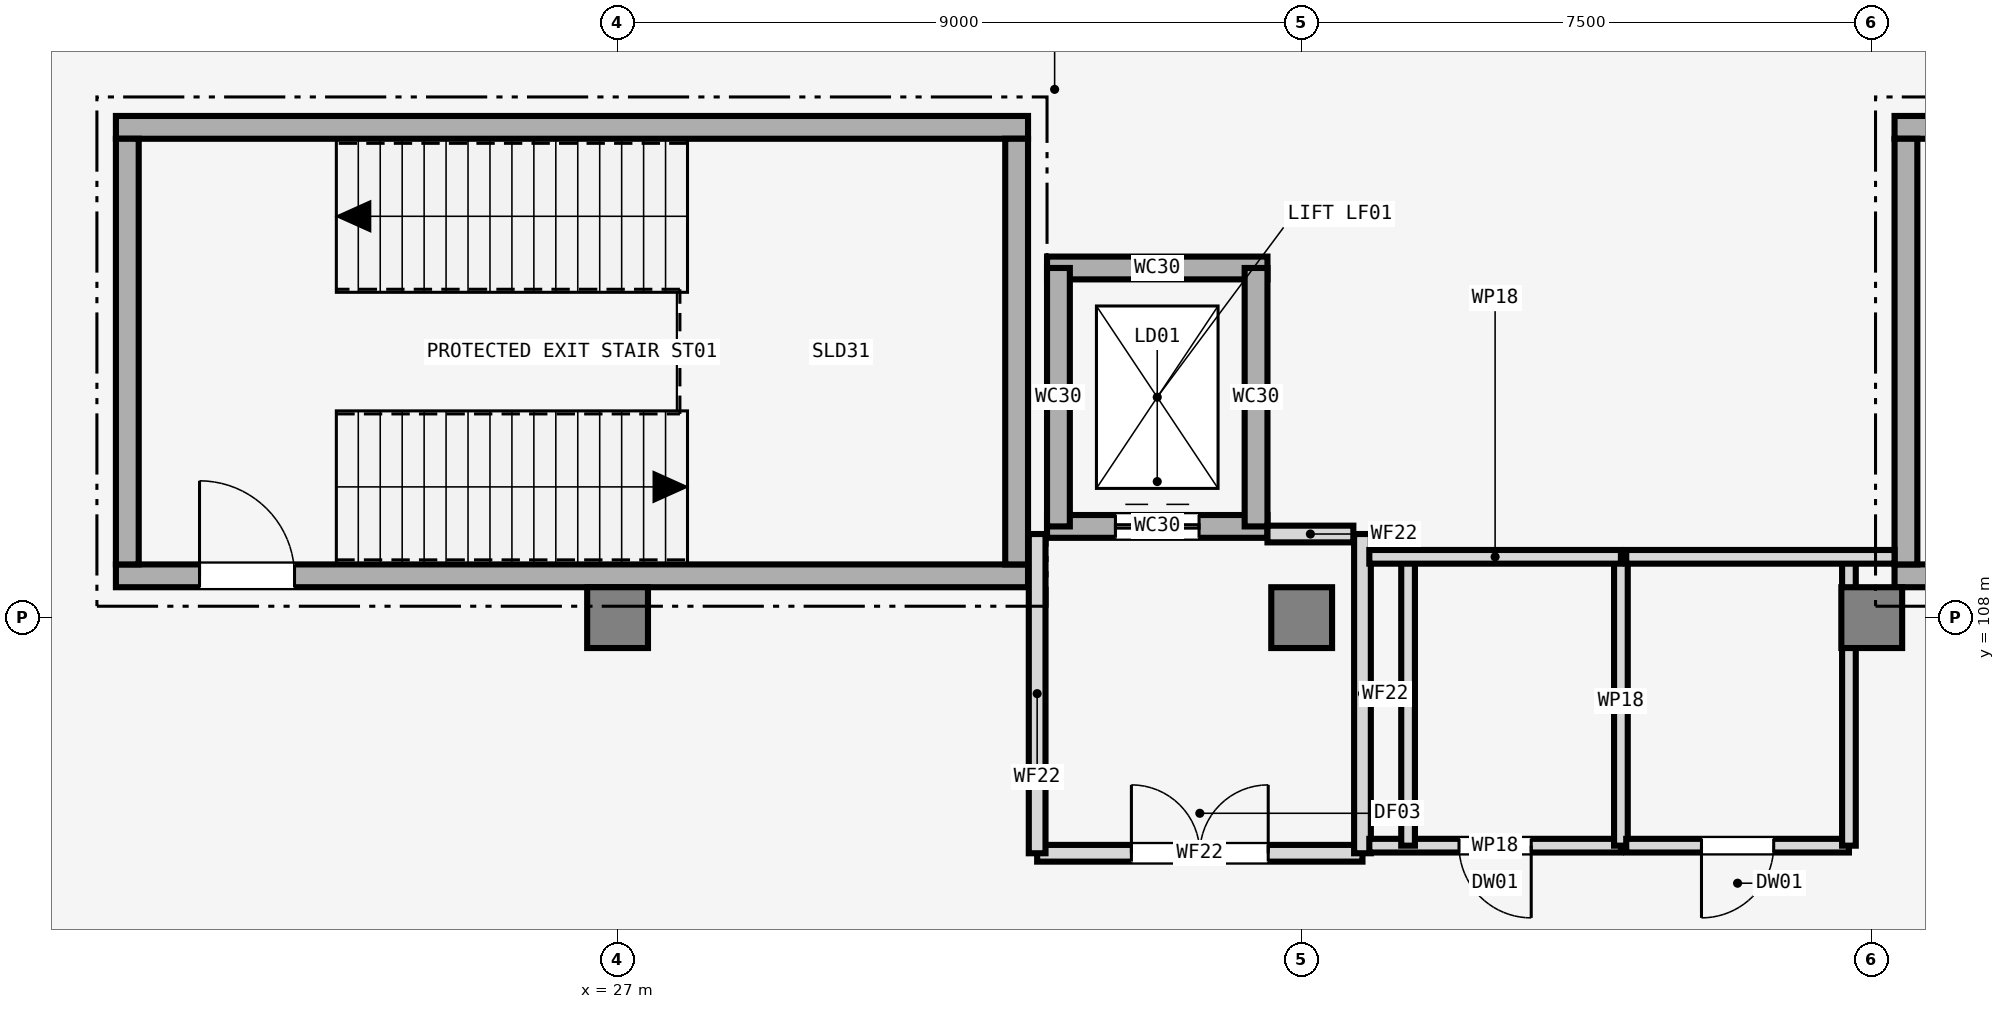
"""IFC4 building model, lengths in metres.
Left out: names, types, materials, properties, quantities, classifications, styles, units other than length and angle.
Written with IfcOpenShell. Run it as: python <this file> out.ifc"""

import sys

from ifc_helpers import new_model, si_unit, direction, frame, frame_2d, origin, origin_2d, place, context, subcontext, project, spatial, rectangle, extrude, element, fill, save


model = new_model("IFC4")
c1 = context("Model", 3, precision=1e-05, world=origin(), true_north=direction((0.0, 1.0)))
c2 = subcontext(c1, "Body", "Model", "MODEL_VIEW")
j1 = project(units=[si_unit("LENGTHUNIT", "METRE"), si_unit("PLANEANGLEUNIT", "RADIAN")], contexts=[c1])
p1 = place(None, origin())
s1 = spatial("IfcSite", under=j1, at=p1, CompositionType="ELEMENT")
p2 = place(p1, origin())
s2 = spatial("IfcBuilding", under=s1, at=p2, CompositionType="ELEMENT")
p3 = place(p2, frame((0.0, 0.0, -5.4)))
s3 = spatial("IfcBuildingStorey", under=s2, at=p3, CompositionType="ELEMENT", Elevation=-5.4)
for number, where, z_axis, x_axis in (
    (1, (27.0, 108.0, 0.0), (0.0, 0.0, 1.0), (1.0, 0.0, 0.0)),
    (2, (36.0, 108.0, 0.0), (0.0, 0.0, 1.0), (1.0, 0.0, 0.0)),
    (3, (43.5, 108.0, 0.0), (0.0, 0.0, 1.0), (1.0, 0.0, 0.0)),
):
    element("IfcColumn", number, at=place(p3, frame(where, z_axis=z_axis, x_axis=x_axis)), inside=s3, PredefinedType="COLUMN", context=c2, shape_type="SweptSolid", body=[
        extrude(rectangle(XDim=0.8, YDim=0.8, at=origin_2d()), origin(), (0.0, 0.0, 1.0), 5.4),
    ])
p4 = place(p3, frame((20.4, 108.55, 0.0), z_axis=(0.0, 0.0, 1.0), x_axis=(1.0, 0.0, 0.0)))
e4 = element("IfcWall", 4, at=p4, inside=s3, PredefinedType="SHEAR", context=c2, shape_type="SweptSolid", body=[
    extrude(rectangle(XDim=12.0, YDim=0.3, at=frame_2d((6.0, 0.0))), origin(), (0.0, 0.0, 1.0), 5.4),
])
p5 = place(p4, frame((1.1, 0.0, 0.0)))
e5 = element("IfcOpeningElement", 5, at=p5, cuts=e4, PredefinedType="OPENING", context=c2, shape_type="SweptSolid", body=[
    extrude(rectangle(XDim=1.25, YDim=2.15, at=frame_2d((0.625, 1.075))), frame((0.0, 0.16, 0.0), z_axis=(0.0, -1.0, 0.0), x_axis=(1.0, 0.0, 0.0)), (0.0, 0.0, 1.0), 0.32),
])
p6 = place(p3, frame((32.4, 114.45, 0.0), z_axis=(0.0, 0.0, 1.0), x_axis=(-1.0, 0.0, 0.0)))
e6 = element("IfcWall", 6, at=p6, inside=s3, PredefinedType="SHEAR", context=c2, shape_type="SweptSolid", body=[
    extrude(rectangle(XDim=12.0, YDim=0.3, at=frame_2d((6.0, 0.0))), origin(), (0.0, 0.0, 1.0), 5.4),
])
for number, where, z_axis, x_axis in (
    (7, (20.55, 114.3, 0.0), (0.0, 0.0, 1.0), (0.0, -1.0, 0.0)),
    (8, (32.25, 108.7, 0.0), (0.0, 0.0, 1.0), (0.0, 1.0, 0.0)),
):
    element("IfcWall", number, at=place(p3, frame(where, z_axis=z_axis, x_axis=x_axis)), inside=s3, PredefinedType="SHEAR", context=c2, shape_type="SweptSolid", body=[
        extrude(rectangle(XDim=5.6, YDim=0.3, at=frame_2d((2.8, 0.0))), origin(), (0.0, 0.0, 1.0), 5.4),
    ])
p7 = place(p3, frame((43.8, 108.55, 0.0), z_axis=(0.0, 0.0, 1.0), x_axis=(1.0, 0.0, 0.0)))
e9 = element("IfcWall", 9, at=p7, inside=s3, PredefinedType="SHEAR", context=c2, shape_type="SweptSolid", body=[
    extrude(rectangle(XDim=12.0, YDim=0.3, at=frame_2d((6.0, 0.0))), origin(), (0.0, 0.0, 1.0), 5.4),
])
p8 = place(p7, frame((1.1, 0.0, 0.0)))
e10 = element("IfcOpeningElement", 10, at=p8, cuts=e9, PredefinedType="OPENING", context=c2, shape_type="SweptSolid", body=[
    extrude(rectangle(XDim=1.25, YDim=2.15, at=frame_2d((0.625, 1.075))), frame((0.0, 0.16, 0.0), z_axis=(0.0, -1.0, 0.0), x_axis=(1.0, 0.0, 0.0)), (0.0, 0.0, 1.0), 0.32),
])
p9 = place(p3, frame((55.8, 114.45, 0.0), z_axis=(0.0, 0.0, 1.0), x_axis=(-1.0, 0.0, 0.0)))
e11 = element("IfcWall", 11, at=p9, inside=s3, PredefinedType="SHEAR", context=c2, shape_type="SweptSolid", body=[
    extrude(rectangle(XDim=12.0, YDim=0.3, at=frame_2d((6.0, 0.0))), origin(), (0.0, 0.0, 1.0), 5.4),
])
p10 = place(p3, frame((43.95, 114.3, 0.0), z_axis=(0.0, 0.0, 1.0), x_axis=(0.0, -1.0, 0.0)))
e12 = element("IfcWall", 12, at=p10, inside=s3, PredefinedType="SHEAR", context=c2, shape_type="SweptSolid", body=[
    extrude(rectangle(XDim=5.6, YDim=0.3, at=frame_2d((2.8, 0.0))), origin(), (0.0, 0.0, 1.0), 5.4),
])
p11 = place(p3, frame((32.65, 109.2, 0.0), z_axis=(0.0, 0.0, 1.0), x_axis=(1.0, 0.0, 0.0)))
e13 = element("IfcWall", 13, at=p11, inside=s3, PredefinedType="SHEAR", context=c2, shape_type="SweptSolid", body=[
    extrude(rectangle(XDim=2.9, YDim=0.3, at=frame_2d((1.45, 0.0))), origin(), (0.0, 0.0, 1.0), 5.4),
])
p12 = place(p11, frame((0.9, 0.0, 0.0)))
e14 = element("IfcOpeningElement", 14, at=p12, cuts=e13, PredefinedType="OPENING", context=c2, shape_type="SweptSolid", body=[
    extrude(rectangle(XDim=1.1, YDim=2.15, at=frame_2d((0.55, 1.075))), frame((0.0, 0.16, 0.0), z_axis=(0.0, -1.0, 0.0), x_axis=(1.0, 0.0, 0.0)), (0.0, 0.0, 1.0), 0.32),
])
p13 = place(p3, frame((35.55, 112.6, 0.0), z_axis=(0.0, 0.0, 1.0), x_axis=(-1.0, 0.0, 0.0)))
e15 = element("IfcWall", 15, at=p13, inside=s3, PredefinedType="SHEAR", context=c2, shape_type="SweptSolid", body=[
    extrude(rectangle(XDim=2.9, YDim=0.3, at=frame_2d((1.45, 0.0))), origin(), (0.0, 0.0, 1.0), 5.4),
])
for number, where, z_axis, x_axis in (
    (16, (32.8, 112.6, 0.0), (0.0, 0.0, 1.0), (0.0, -1.0, 0.0)),
    (17, (35.4, 109.2, 0.0), (0.0, 0.0, 1.0), (0.0, 1.0, 0.0)),
):
    element("IfcWall", number, at=place(p3, frame(where, z_axis=z_axis, x_axis=x_axis)), inside=s3, PredefinedType="SHEAR", context=c2, shape_type="SweptSolid", body=[
        extrude(rectangle(XDim=3.4, YDim=0.3, at=frame_2d((1.7, 0.0))), origin(), (0.0, 0.0, 1.0), 5.4),
    ])
p14 = place(p3, frame((32.52, 104.9, 0.0), z_axis=(0.0, 0.0, 1.0), x_axis=(1.0, 0.0, 0.0)))
e18 = element("IfcWall", 18, at=p14, inside=s3, PredefinedType="SOLIDWALL", context=c2, shape_type="SweptSolid", body=[
    extrude(rectangle(XDim=4.28, YDim=0.22, at=frame_2d((2.14, 0.0))), origin(), (0.0, 0.0, 1.0), 4.05),
])
p15 = place(p14, frame((1.24, 0.0, 0.0)))
e19 = element("IfcOpeningElement", 19, at=p15, cuts=e18, PredefinedType="OPENING", context=c2, shape_type="SweptSolid", body=[
    extrude(rectangle(XDim=1.8, YDim=2.2, at=frame_2d((0.9, 1.1))), frame((0.0, 0.12, 0.0), z_axis=(0.0, -1.0, 0.0), x_axis=(1.0, 0.0, 0.0)), (0.0, 0.0, 1.0), 0.24),
])
for number, where, z_axis, x_axis in (
    (20, (32.52, 104.9, 0.0), (0.0, 0.0, 1.0), (0.0, 1.0, 0.0)),
    (21, (36.8, 104.9, 0.0), (0.0, 0.0, 1.0), (0.0, 1.0, 0.0)),
):
    element("IfcWall", number, at=place(p3, frame(where, z_axis=z_axis, x_axis=x_axis)), inside=s3, PredefinedType="SOLIDWALL", context=c2, shape_type="SweptSolid", body=[
        extrude(rectangle(XDim=4.2, YDim=0.22, at=frame_2d((2.1, 0.0))), origin(), (0.0, 0.0, 1.0), 4.05),
    ])
p16 = place(p3, frame((35.55, 109.1, 0.0), z_axis=(0.0, 0.0, 1.0), x_axis=(1.0, 0.0, 0.0)))
e22 = element("IfcWall", 22, at=p16, inside=s3, PredefinedType="SOLIDWALL", context=c2, shape_type="SweptSolid", body=[
    extrude(rectangle(XDim=1.13, YDim=0.22, at=frame_2d((0.565, 0.0))), origin(), (0.0, 0.0, 1.0), 4.05),
])
p17 = place(p3, frame((40.2, 105.0, 0.0), z_axis=(0.0, 0.0, 1.0), x_axis=(-1.0, 0.0, 0.0)))
e23 = element("IfcWall", 23, at=p17, inside=s3, PredefinedType="PARTITIONING", context=c2, shape_type="SweptSolid", body=[
    extrude(rectangle(XDim=3.31, YDim=0.18, at=frame_2d((1.655, 0.0))), origin(), (0.0, 0.0, 1.0), 4.05),
])
p18 = place(p17, frame((1.18, 0.0, 0.0)))
e24 = element("IfcOpeningElement", 24, at=p18, cuts=e23, PredefinedType="OPENING", context=c2, shape_type="SweptSolid", body=[
    extrude(rectangle(XDim=0.95, YDim=2.1, at=frame_2d((0.475, 1.05))), frame((0.0, 0.1, 0.0), z_axis=(0.0, -1.0, 0.0), x_axis=(1.0, 0.0, 0.0)), (0.0, 0.0, 1.0), 0.2),
])
for number, where, z_axis, x_axis in (
    (25, (40.2, 108.8, 0.0), (0.0, 0.0, 1.0), (0.0, -1.0, 0.0)),
    (26, (37.4, 105.0, 0.0), (0.0, 0.0, 1.0), (0.0, 1.0, 0.0)),
):
    element("IfcWall", number, at=place(p3, frame(where, z_axis=z_axis, x_axis=x_axis)), inside=s3, PredefinedType="PARTITIONING", context=c2, shape_type="SweptSolid", body=[
        extrude(rectangle(XDim=3.8, YDim=0.18, at=frame_2d((1.9, 0.0))), origin(), (0.0, 0.0, 1.0), 4.05),
    ])
p19 = place(p3, frame((36.89, 108.8, 0.0), z_axis=(0.0, 0.0, 1.0), x_axis=(1.0, 0.0, 0.0)))
e27 = element("IfcWall", 27, at=p19, inside=s3, PredefinedType="PARTITIONING", context=c2, shape_type="SweptSolid", body=[
    extrude(rectangle(XDim=3.31, YDim=0.18, at=frame_2d((1.655, 0.0))), origin(), (0.0, 0.0, 1.0), 4.05),
])
p20 = place(p3, frame((43.2, 105.0, 0.0), z_axis=(0.0, 0.0, 1.0), x_axis=(-1.0, 0.0, 0.0)))
e28 = element("IfcWall", 28, at=p20, inside=s3, PredefinedType="PARTITIONING", context=c2, shape_type="SweptSolid", body=[
    extrude(rectangle(XDim=2.93, YDim=0.18, at=frame_2d((1.465, 0.0))), origin(), (0.0, 0.0, 1.0), 4.05),
])
p21 = place(p20, frame((0.99, 0.0, 0.0)))
e29 = element("IfcOpeningElement", 29, at=p21, cuts=e28, PredefinedType="OPENING", context=c2, shape_type="SweptSolid", body=[
    extrude(rectangle(XDim=0.95, YDim=2.1, at=frame_2d((0.475, 1.05))), frame((0.0, 0.1, 0.0), z_axis=(0.0, -1.0, 0.0), x_axis=(1.0, 0.0, 0.0)), (0.0, 0.0, 1.0), 0.2),
])
p22 = place(p3, frame((43.2, 108.8, 0.0), z_axis=(0.0, 0.0, 1.0), x_axis=(0.0, -1.0, 0.0)))
e30 = element("IfcWall", 30, at=p22, inside=s3, PredefinedType="PARTITIONING", context=c2, shape_type="SweptSolid", body=[
    extrude(rectangle(XDim=3.8, YDim=0.18, at=frame_2d((1.9, 0.0))), origin(), (0.0, 0.0, 1.0), 4.05),
])
p23 = place(p3, frame((40.27, 108.8, 0.0), z_axis=(0.0, 0.0, 1.0), x_axis=(1.0, 0.0, 0.0)))
e31 = element("IfcWall", 31, at=p23, inside=s3, PredefinedType="PARTITIONING", context=c2, shape_type="SweptSolid", body=[
    extrude(rectangle(XDim=3.53, YDim=0.18, at=frame_2d((1.765, 0.0))), origin(), (0.0, 0.0, 1.0), 4.05),
])
p24 = place(p5, origin())
e32 = element("IfcDoor", 32, at=p24, inside=s3, OperationType="SINGLE_SWING_LEFT", PredefinedType="DOOR", context=c2, shape_type="SweptSolid", body=[
    extrude(rectangle(XDim=1.25, YDim=2.15, at=frame_2d((0.625, 1.075))), frame((0.0, 0.025, 0.0), z_axis=(0.0, -1.0, 0.0), x_axis=(1.0, 0.0, 0.0)), (0.0, 0.0, 1.0), 0.05),
])
fill(e5, e32)
p25 = place(p12, origin())
e33 = element("IfcDoor", 33, at=p25, inside=s3, OperationType="DOUBLE_DOOR_SLIDING", PredefinedType="DOOR", context=c2, shape_type="SweptSolid", body=[
    extrude(rectangle(XDim=1.1, YDim=2.15, at=frame_2d((0.55, 1.075))), frame((0.0, 0.025, 0.0), z_axis=(0.0, -1.0, 0.0), x_axis=(1.0, 0.0, 0.0)), (0.0, 0.0, 1.0), 0.05),
])
fill(e14, e33)
p26 = place(p15, origin())
e34 = element("IfcDoor", 34, at=p26, inside=s3, OperationType="DOUBLE_DOOR_SINGLE_SWING", PredefinedType="DOOR", context=c2, shape_type="SweptSolid", body=[
    extrude(rectangle(XDim=1.8, YDim=2.2, at=frame_2d((0.9, 1.1))), frame((0.0, 0.025, 0.0), z_axis=(0.0, -1.0, 0.0), x_axis=(1.0, 0.0, 0.0)), (0.0, 0.0, 1.0), 0.05),
])
fill(e19, e34)
p27 = place(p18, origin())
e35 = element("IfcDoor", 35, at=p27, inside=s3, OperationType="SINGLE_SWING_LEFT", PredefinedType="DOOR", context=c2, shape_type="SweptSolid", body=[
    extrude(rectangle(XDim=0.95, YDim=2.1, at=frame_2d((0.475, 1.05))), frame((0.0, 0.025, 0.0), z_axis=(0.0, -1.0, 0.0), x_axis=(1.0, 0.0, 0.0)), (0.0, 0.0, 1.0), 0.05),
])
fill(e24, e35)
p28 = place(p21, origin())
e36 = element("IfcDoor", 36, at=p28, inside=s3, OperationType="SINGLE_SWING_RIGHT", PredefinedType="DOOR", context=c2, shape_type="SweptSolid", body=[
    extrude(rectangle(XDim=0.95, YDim=2.1, at=frame_2d((0.475, 1.05))), frame((0.0, 0.025, 0.0), z_axis=(0.0, -1.0, 0.0), x_axis=(1.0, 0.0, 0.0)), (0.0, 0.0, 1.0), 0.05),
])
fill(e29, e36)
save(model, sys.argv[1])
